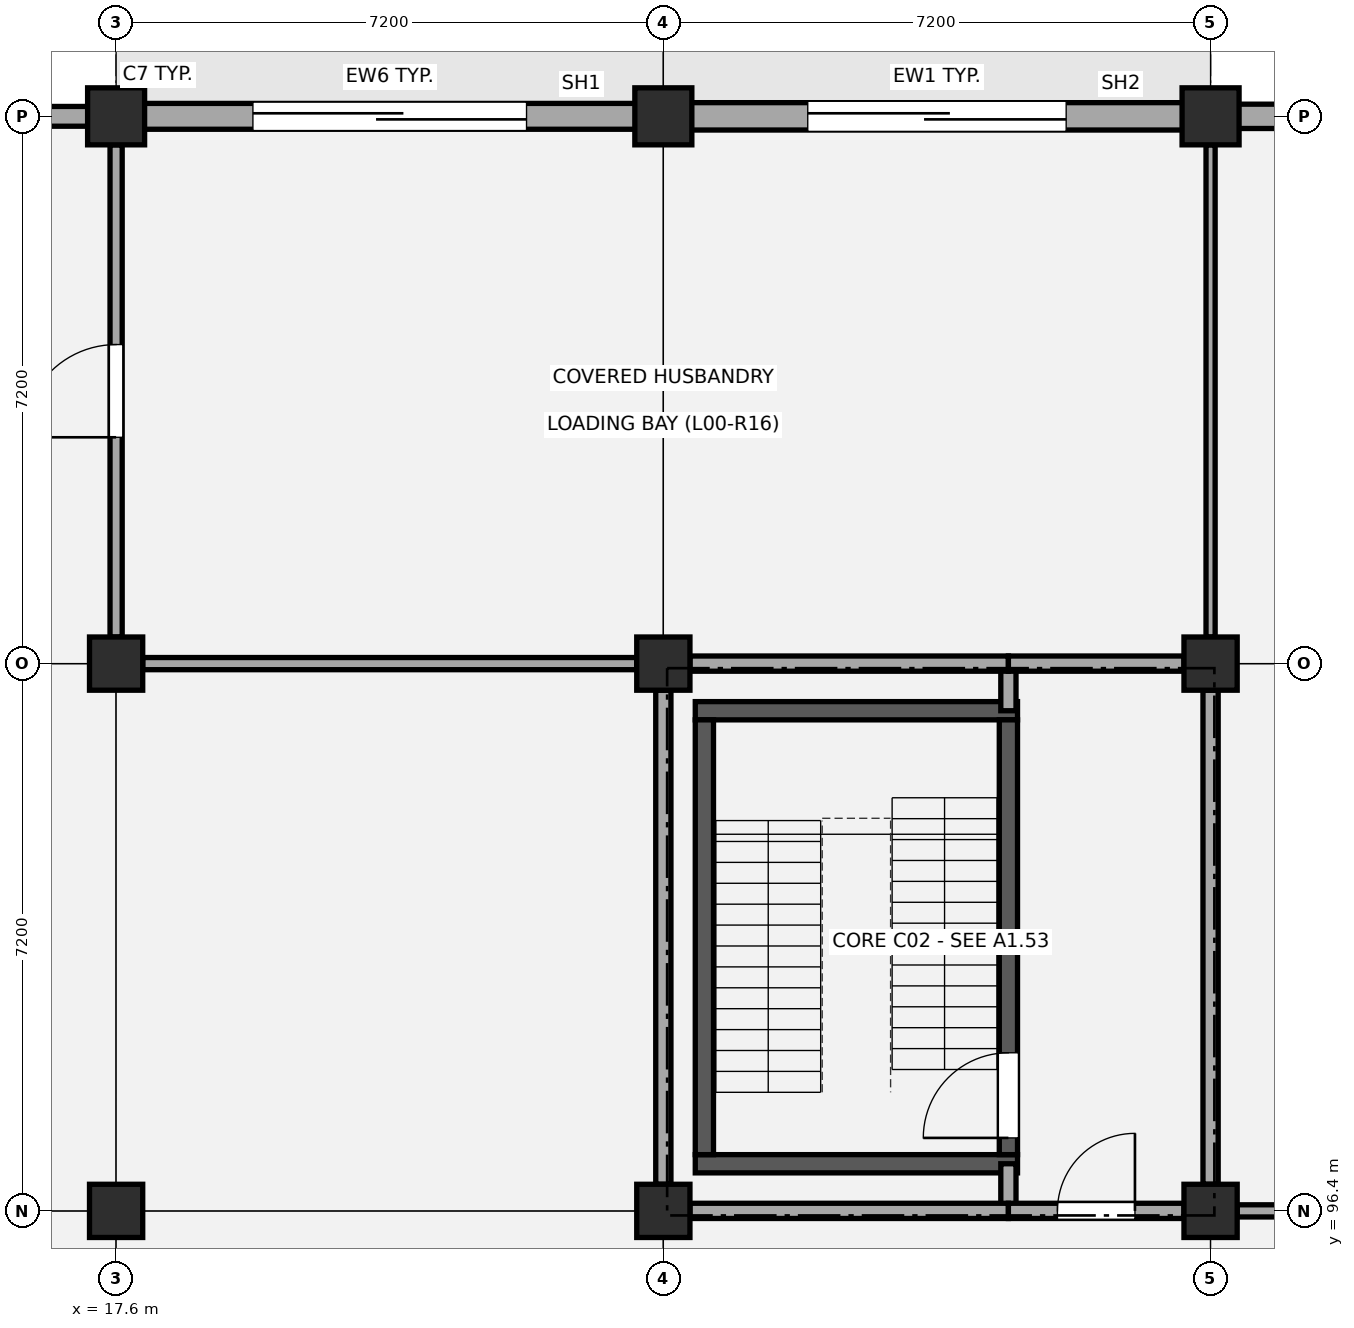
"""IFC4 building model, lengths in metres.
Left out: names, types, materials, properties, quantities, classifications, styles, units other than length and angle.
Written with IfcOpenShell. Run it as: python <this file> out.ifc"""

import sys

from ifc_helpers import new_model, si_unit, direction, frame, frame_2d, origin, origin_2d, place, context, subcontext, project, spatial, rectangle, circle, extrude, element, fill, save


model = new_model("IFC4")
c1 = context("Model", 3, precision=1e-05, world=origin(), true_north=direction((0.0, 1.0)))
c2 = subcontext(c1, "Body", "Model", "MODEL_VIEW")
j1 = project(units=[si_unit("LENGTHUNIT", "METRE"), si_unit("PLANEANGLEUNIT", "RADIAN")], contexts=[c1])
p1 = place(None, origin())
s1 = spatial("IfcSite", under=j1, at=p1, CompositionType="ELEMENT")
p2 = place(p1, origin())
s2 = spatial("IfcBuilding", under=s1, at=p2, CompositionType="ELEMENT")
p3 = place(p2, origin())
s3 = spatial("IfcBuildingStorey", under=s2, at=p3, CompositionType="ELEMENT", Elevation=0.0)
for number, where, z_axis, x_axis in (
    (1, (17.6, 96.4, -0.35), (0.0, 0.0, 1.0), (1.0, 0.0, 0.0)),
    (2, (17.6, 103.6, -0.35), (0.0, 0.0, 1.0), (1.0, 0.0, 0.0)),
):
    element("IfcColumn", number, at=place(p3, frame(where, z_axis=z_axis, x_axis=x_axis)), inside=s3, PredefinedType="COLUMN", context=c2, shape_type="SweptSolid", body=[
        extrude(rectangle(XDim=0.7, YDim=0.7, at=origin_2d()), origin(), (0.0, 0.0, 1.0), 5.03),
    ])
p4 = place(p3, frame((17.6, 110.8, -0.35), z_axis=(0.0, 0.0, 1.0), x_axis=(1.0, 0.0, 0.0)))
e3 = element("IfcColumn", 3, at=p4, inside=s3, PredefinedType="COLUMN", context=c2, shape_type="SweptSolid", body=[
    extrude(circle(Radius=0.375, at=origin_2d()), origin(), (0.0, 0.0, 1.0), 5.03),
])
for number, where, z_axis, x_axis in (
    (4, (24.8, 96.4, -0.35), (0.0, 0.0, 1.0), (1.0, 0.0, 0.0)),
    (5, (24.8, 103.6, -0.35), (0.0, 0.0, 1.0), (1.0, 0.0, 0.0)),
):
    element("IfcColumn", number, at=place(p3, frame(where, z_axis=z_axis, x_axis=x_axis)), inside=s3, PredefinedType="COLUMN", context=c2, shape_type="SweptSolid", body=[
        extrude(rectangle(XDim=0.7, YDim=0.7, at=origin_2d()), origin(), (0.0, 0.0, 1.0), 5.03),
    ])
p5 = place(p3, frame((24.8, 110.8, -0.35), z_axis=(0.0, 0.0, 1.0), x_axis=(1.0, 0.0, 0.0)))
e6 = element("IfcColumn", 6, at=p5, inside=s3, PredefinedType="COLUMN", context=c2, shape_type="SweptSolid", body=[
    extrude(circle(Radius=0.375, at=origin_2d()), origin(), (0.0, 0.0, 1.0), 5.03),
])
for number, where, z_axis, x_axis in (
    (7, (32.0, 96.4, -0.35), (0.0, 0.0, 1.0), (1.0, 0.0, 0.0)),
    (8, (32.0, 103.6, -0.35), (0.0, 0.0, 1.0), (1.0, 0.0, 0.0)),
):
    element("IfcColumn", number, at=place(p3, frame(where, z_axis=z_axis, x_axis=x_axis)), inside=s3, PredefinedType="COLUMN", context=c2, shape_type="SweptSolid", body=[
        extrude(rectangle(XDim=0.7, YDim=0.7, at=origin_2d()), origin(), (0.0, 0.0, 1.0), 5.03),
    ])
p6 = place(p3, frame((32.0, 110.8, -0.35), z_axis=(0.0, 0.0, 1.0), x_axis=(1.0, 0.0, 0.0)))
e9 = element("IfcColumn", 9, at=p6, inside=s3, PredefinedType="COLUMN", context=c2, shape_type="SweptSolid", body=[
    extrude(circle(Radius=0.375, at=origin_2d()), origin(), (0.0, 0.0, 1.0), 5.03),
])
p7 = place(p3, frame((10.71, 110.8, 0.0), z_axis=(0.0, 0.0, 1.0), x_axis=(1.0, 0.0, 0.0)))
e10 = element("IfcWall", 10, at=p7, inside=s3, PredefinedType="STANDARD", context=c2, shape_type="SweptSolid", body=[
    extrude(rectangle(XDim=6.58, YDim=0.26, at=frame_2d((3.29, 0.0))), origin(), (0.0, 0.0, 1.0), 3.67),
])
p8 = place(p3, frame((17.91, 110.8, 0.0), z_axis=(0.0, 0.0, 1.0), x_axis=(1.0, 0.0, 0.0)))
e11 = element("IfcWall", 11, at=p8, inside=s3, PredefinedType="STANDARD", context=c2, shape_type="SweptSolid", body=[
    extrude(rectangle(XDim=6.58, YDim=0.34, at=frame_2d((3.29, 0.0))), origin(), (0.0, 0.0, 1.0), 3.67),
])
p9 = place(p8, frame((1.49, 0.0, 0.0)))
e12 = element("IfcOpeningElement", 12, at=p9, cuts=e11, PredefinedType="OPENING", context=c2, shape_type="SweptSolid", body=[
    extrude(rectangle(XDim=3.6, YDim=3.4, at=frame_2d((1.8, 1.7))), frame((0.0, 0.18, 0.0), z_axis=(0.0, -1.0, 0.0), x_axis=(1.0, 0.0, 0.0)), (0.0, 0.0, 1.0), 0.36),
])
p10 = place(p3, frame((25.11, 110.8, 0.0), z_axis=(0.0, 0.0, 1.0), x_axis=(1.0, 0.0, 0.0)))
e13 = element("IfcWall", 13, at=p10, inside=s3, PredefinedType="STANDARD", context=c2, shape_type="SweptSolid", body=[
    extrude(rectangle(XDim=6.58, YDim=0.36, at=frame_2d((3.29, 0.0))), origin(), (0.0, 0.0, 1.0), 3.67),
])
p11 = place(p10, frame((1.59, 0.0, 0.0)))
e14 = element("IfcOpeningElement", 14, at=p11, cuts=e13, PredefinedType="OPENING", context=c2, shape_type="SweptSolid", body=[
    extrude(rectangle(XDim=3.4, YDim=3.3, at=frame_2d((1.7, 1.65))), frame((0.0, 0.19, 0.0), z_axis=(0.0, -1.0, 0.0), x_axis=(1.0, 0.0, 0.0)), (0.0, 0.0, 1.0), 0.38),
])
p12 = place(p3, frame((32.31, 110.8, 0.0), z_axis=(0.0, 0.0, 1.0), x_axis=(1.0, 0.0, 0.0)))
e15 = element("IfcWall", 15, at=p12, inside=s3, PredefinedType="STANDARD", context=c2, shape_type="SweptSolid", body=[
    extrude(rectangle(XDim=6.58, YDim=0.32, at=frame_2d((3.29, 0.0))), origin(), (0.0, 0.0, 1.0), 3.67),
])
for number, where, z_axis, x_axis in (
    (16, (25.22, 97.02, 0.0), (0.0, 0.0, 1.0), (1.0, 0.0, 0.0)),
    (17, (25.22, 102.98, 0.0), (0.0, 0.0, 1.0), (1.0, 0.0, 0.0)),
):
    element("IfcWall", number, at=place(p3, frame(where, z_axis=z_axis, x_axis=x_axis)), inside=s3, PredefinedType="SHEAR", context=c2, shape_type="SweptSolid", body=[
        extrude(rectangle(XDim=4.24, YDim=0.24, at=frame_2d((2.12, 0.0))), origin(), (0.0, 0.0, 1.0), 4.38),
    ])
p13 = place(p3, frame((25.34, 97.14, 0.0), z_axis=(0.0, 0.0, 1.0), x_axis=(0.0, 1.0, 0.0)))
e18 = element("IfcWall", 18, at=p13, inside=s3, PredefinedType="SHEAR", context=c2, shape_type="SweptSolid", body=[
    extrude(rectangle(XDim=5.72, YDim=0.24, at=frame_2d((2.86, 0.0))), origin(), (0.0, 0.0, 1.0), 4.38),
])
p14 = place(p3, frame((29.34, 97.14, 0.0), z_axis=(0.0, 0.0, 1.0), x_axis=(0.0, 1.0, 0.0)))
e19 = element("IfcWall", 19, at=p14, inside=s3, PredefinedType="SHEAR", context=c2, shape_type="SweptSolid", body=[
    extrude(rectangle(XDim=5.72, YDim=0.24, at=frame_2d((2.86, 0.0))), origin(), (0.0, 0.0, 1.0), 4.38),
])
p15 = place(p14, frame((0.22, 0.0, 0.0)))
e20 = element("IfcOpeningElement", 20, at=p15, cuts=e19, PredefinedType="OPENING", context=c2, shape_type="SweptSolid", body=[
    extrude(rectangle(XDim=1.12, YDim=2.15, at=frame_2d((0.56, 1.075))), frame((0.0, 0.13, 0.0), z_axis=(0.0, -1.0, 0.0), x_axis=(1.0, 0.0, 0.0)), (0.0, 0.0, 1.0), 0.26),
])
p16 = place(p3, frame((29.34, 96.4, 0.0), z_axis=(0.0, 0.0, 1.0), x_axis=(0.0, 1.0, 0.0)))
e21 = element("IfcWall", 21, at=p16, inside=s3, PredefinedType="PARTITIONING", context=c2, shape_type="SweptSolid", body=[
    extrude(rectangle(XDim=0.62, YDim=0.2, at=frame_2d((0.31, 0.0))), origin(), (0.0, 0.0, 1.0), 3.52),
])
p17 = place(p3, frame((29.34, 102.98, 0.0), z_axis=(0.0, 0.0, 1.0), x_axis=(0.0, 1.0, 0.0)))
e22 = element("IfcWall", 22, at=p17, inside=s3, PredefinedType="PARTITIONING", context=c2, shape_type="SweptSolid", body=[
    extrude(rectangle(XDim=0.62, YDim=0.2, at=frame_2d((0.31, 0.0))), origin(), (0.0, 0.0, 1.0), 3.62),
])
for number, where, z_axis, x_axis in (
    (23, (24.8, 96.75, 0.0), (0.0, 0.0, 1.0), (0.0, 1.0, 0.0)),
    (24, (32.0, 96.75, 0.0), (0.0, 0.0, 1.0), (0.0, 1.0, 0.0)),
):
    element("IfcWall", number, at=place(p3, frame(where, z_axis=z_axis, x_axis=x_axis)), inside=s3, PredefinedType="PARTITIONING", context=c2, shape_type="SweptSolid", body=[
        extrude(rectangle(XDim=6.5, YDim=0.2, at=frame_2d((3.25, 0.0))), origin(), (0.0, 0.0, 1.0), 3.62),
    ])
p18 = place(p3, frame((25.15, 96.4, 0.0), z_axis=(0.0, 0.0, 1.0), x_axis=(1.0, 0.0, 0.0)))
e25 = element("IfcWall", 25, at=p18, inside=s3, PredefinedType="PARTITIONING", context=c2, shape_type="SweptSolid", body=[
    extrude(rectangle(XDim=4.19, YDim=0.2, at=frame_2d((2.095, 0.0))), origin(), (0.0, 0.0, 1.0), 3.52),
])
p19 = place(p3, frame((29.34, 96.4, 0.0), z_axis=(0.0, 0.0, 1.0), x_axis=(1.0, 0.0, 0.0)))
e26 = element("IfcWall", 26, at=p19, inside=s3, PredefinedType="PARTITIONING", context=c2, shape_type="SweptSolid", body=[
    extrude(rectangle(XDim=2.31, YDim=0.2, at=frame_2d((1.155, 0.0))), origin(), (0.0, 0.0, 1.0), 3.52),
])
p20 = place(p19, frame((0.645, 0.0, 0.0)))
e27 = element("IfcOpeningElement", 27, at=p20, cuts=e26, PredefinedType="OPENING", context=c2, shape_type="SweptSolid", body=[
    extrude(rectangle(XDim=1.02, YDim=2.15, at=frame_2d((0.51, 1.075))), frame((0.0, 0.11, 0.0), z_axis=(0.0, -1.0, 0.0), x_axis=(1.0, 0.0, 0.0)), (0.0, 0.0, 1.0), 0.22),
])
p21 = place(p3, frame((25.15, 103.6, 0.0), z_axis=(0.0, 0.0, 1.0), x_axis=(1.0, 0.0, 0.0)))
e28 = element("IfcWall", 28, at=p21, inside=s3, PredefinedType="PARTITIONING", context=c2, shape_type="SweptSolid", body=[
    extrude(rectangle(XDim=4.19, YDim=0.2, at=frame_2d((2.095, 0.0))), origin(), (0.0, 0.0, 1.0), 3.62),
])
p22 = place(p3, frame((29.34, 103.6, 0.0), z_axis=(0.0, 0.0, 1.0), x_axis=(1.0, 0.0, 0.0)))
e29 = element("IfcWall", 29, at=p22, inside=s3, PredefinedType="PARTITIONING", context=c2, shape_type="SweptSolid", body=[
    extrude(rectangle(XDim=2.31, YDim=0.2, at=frame_2d((1.155, 0.0))), origin(), (0.0, 0.0, 1.0), 3.62),
])
p23 = place(p3, frame((17.6, 103.95, 0.0), z_axis=(0.0, 0.0, 1.0), x_axis=(0.0, 1.0, 0.0)))
e30 = element("IfcWall", 30, at=p23, inside=s3, PredefinedType="PARTITIONING", context=c2, shape_type="SweptSolid", body=[
    extrude(rectangle(XDim=6.475, YDim=0.16, at=frame_2d((3.238, 0.0))), origin(), (0.0, 0.0, 1.0), 3.62),
])
p24 = place(p23, frame((2.627, 0.0, 0.0)))
e31 = element("IfcOpeningElement", 31, at=p24, cuts=e30, PredefinedType="OPENING", context=c2, shape_type="SweptSolid", body=[
    extrude(rectangle(XDim=1.22, YDim=2.16, at=frame_2d((0.61, 1.08))), frame((0.0, 0.09, 0.0), z_axis=(0.0, -1.0, 0.0), x_axis=(1.0, 0.0, 0.0)), (0.0, 0.0, 1.0), 0.18),
])
p25 = place(p3, frame((17.95, 103.6, 0.0), z_axis=(0.0, 0.0, 1.0), x_axis=(1.0, 0.0, 0.0)))
e32 = element("IfcWall", 32, at=p25, inside=s3, PredefinedType="PARTITIONING", context=c2, shape_type="SweptSolid", body=[
    extrude(rectangle(XDim=6.5, YDim=0.16, at=frame_2d((3.25, 0.0))), origin(), (0.0, 0.0, 1.0), 3.52),
])
p26 = place(p3, frame((32.0, 103.95, 0.0), z_axis=(0.0, 0.0, 1.0), x_axis=(0.0, 1.0, 0.0)))
e33 = element("IfcWall", 33, at=p26, inside=s3, PredefinedType="PARTITIONING", context=c2, shape_type="SweptSolid", body=[
    extrude(rectangle(XDim=6.475, YDim=0.12, at=frame_2d((3.238, 0.0))), origin(), (0.0, 0.0, 1.0), 3.62),
])
p27 = place(p3, frame((32.35, 96.4, 0.0), z_axis=(0.0, 0.0, 1.0), x_axis=(1.0, 0.0, 0.0)))
e34 = element("IfcWall", 34, at=p27, inside=s3, PredefinedType="PARTITIONING", context=c2, shape_type="SweptSolid", body=[
    extrude(rectangle(XDim=6.5, YDim=0.16, at=frame_2d((3.25, 0.0))), origin(), (0.0, 0.0, 1.0), 3.62),
])
p28 = place(p27, frame((2.61, 0.0, 0.0)))
e35 = element("IfcOpeningElement", 35, at=p28, cuts=e34, PredefinedType="OPENING", context=c2, shape_type="SweptSolid", body=[
    extrude(rectangle(XDim=1.28, YDim=2.2, at=frame_2d((0.64, 1.1))), frame((0.0, 0.09, 0.0), z_axis=(0.0, -1.0, 0.0), x_axis=(1.0, 0.0, 0.0)), (0.0, 0.0, 1.0), 0.18),
])
p29 = place(p9, origin())
e36 = element("IfcDoor", 36, at=p29, inside=s3, OperationType="ROLLINGUP", PredefinedType="DOOR", context=c2, shape_type="SweptSolid", body=[
    extrude(rectangle(XDim=3.6, YDim=3.4, at=frame_2d((1.8, 1.7))), frame((0.0, 0.025, 0.0), z_axis=(0.0, -1.0, 0.0), x_axis=(1.0, 0.0, 0.0)), (0.0, 0.0, 1.0), 0.05),
])
fill(e12, e36)
p30 = place(p11, origin())
e37 = element("IfcDoor", 37, at=p30, inside=s3, OperationType="ROLLINGUP", PredefinedType="DOOR", context=c2, shape_type="SweptSolid", body=[
    extrude(rectangle(XDim=3.4, YDim=3.3, at=frame_2d((1.7, 1.65))), frame((0.0, 0.025, 0.0), z_axis=(0.0, -1.0, 0.0), x_axis=(1.0, 0.0, 0.0)), (0.0, 0.0, 1.0), 0.05),
])
fill(e14, e37)
p31 = place(p15, origin())
e38 = element("IfcDoor", 38, at=p31, inside=s3, OperationType="SINGLE_SWING_LEFT", PredefinedType="DOOR", context=c2, shape_type="SweptSolid", body=[
    extrude(rectangle(XDim=1.12, YDim=2.15, at=frame_2d((0.56, 1.075))), frame((0.0, 0.025, 0.0), z_axis=(0.0, -1.0, 0.0), x_axis=(1.0, 0.0, 0.0)), (0.0, 0.0, 1.0), 0.05),
])
fill(e20, e38)
p32 = place(p20, origin())
e39 = element("IfcDoor", 39, at=p32, inside=s3, OperationType="SINGLE_SWING_RIGHT", PredefinedType="DOOR", context=c2, shape_type="SweptSolid", body=[
    extrude(rectangle(XDim=1.02, YDim=2.15, at=frame_2d((0.51, 1.075))), frame((0.0, 0.025, 0.0), z_axis=(0.0, -1.0, 0.0), x_axis=(1.0, 0.0, 0.0)), (0.0, 0.0, 1.0), 0.05),
])
fill(e27, e39)
p33 = place(p24, origin())
e40 = element("IfcDoor", 40, at=p33, inside=s3, OperationType="SINGLE_SWING_LEFT", PredefinedType="DOOR", context=c2, shape_type="SweptSolid", body=[
    extrude(rectangle(XDim=1.22, YDim=2.16, at=frame_2d((0.61, 1.08))), frame((0.0, 0.025, 0.0), z_axis=(0.0, -1.0, 0.0), x_axis=(1.0, 0.0, 0.0)), (0.0, 0.0, 1.0), 0.05),
])
fill(e31, e40)
save(model, sys.argv[1])
